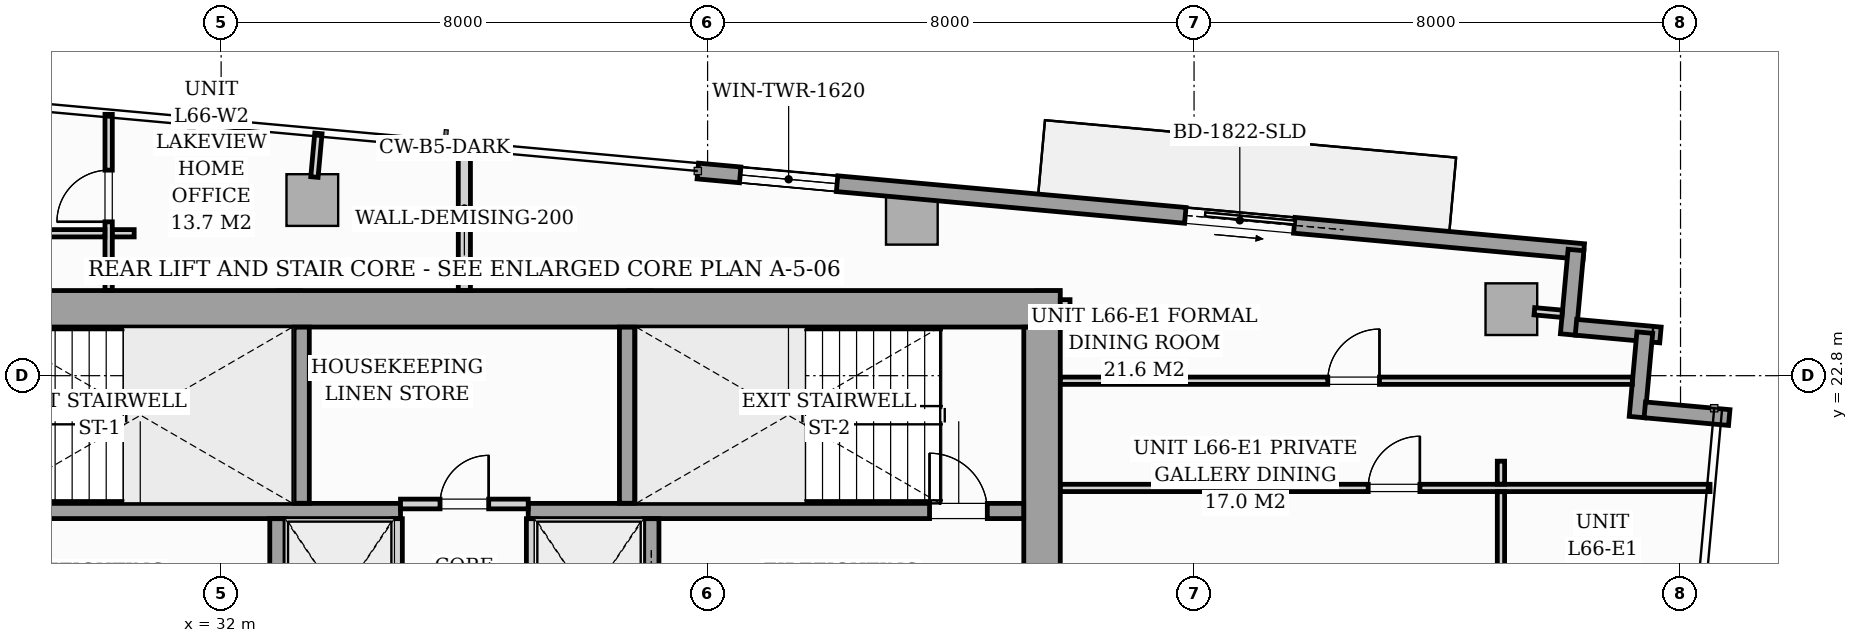
"""IFC4 building model, lengths in metres.
Left out: names, types, materials, properties, quantities, classifications, styles, units other than length and angle.
Written with IfcOpenShell. Run it as: python <this file> out.ifc"""

import sys

from ifc_helpers import new_model, si_unit, direction, frame, frame_2d, origin, origin_2d, place, context, subcontext, project, spatial, rectangle, i_section, extrude, source, transform, mapped, element, fill, save


model = new_model("IFC4")
c1 = context("Model", 3, precision=1e-05, world=origin(), true_north=direction((0.0, 1.0)))
c2 = subcontext(c1, "Body", "Model", "MODEL_VIEW")
j1 = project(units=[si_unit("LENGTHUNIT", "METRE"), si_unit("PLANEANGLEUNIT", "RADIAN")], contexts=[c1])
p1 = place(None, origin())
s1 = spatial("IfcSite", under=j1, at=p1, CompositionType="ELEMENT")
p2 = place(p1, origin())
s2 = spatial("IfcBuilding", under=s1, at=p2, CompositionType="ELEMENT")
p3 = place(p2, frame((0.0, 0.0, 229.8)))
s3 = spatial("IfcBuildingStorey", under=s2, at=p3, CompositionType="ELEMENT", Elevation=229.8)
m1 = source(origin(), c2, "Body", "SweptSolid", [
    extrude(i_section(OverallWidth=0.409, OverallDepth=0.425, WebThickness=0.033, FlangeThickness=0.052, FilletRadius=0.018, at=origin_2d()), origin(), (0.0, 0.0, 1.0), 3.296),
])
for number, where, z_axis, x_axis in (
    (1, (33.12, 24.0, 0.002), (0.0, 0.0, 1.0), (1.0, 0.0, 0.0)),
    (2, (38.88, 24.0, 0.002), (0.0, 0.0, 1.0), (1.0, 0.0, 0.0)),
    (3, (45.6, 24.0, 0.002), (0.0, 0.0, 1.0), (1.0, 0.0, 0.0)),
):
    element("IfcColumn", number, at=place(p3, frame(where, z_axis=z_axis, x_axis=x_axis)), inside=s3, PredefinedType="PILASTER", context=c2, shape_type="MappedRepresentation", body=[
        mapped(m1, transform((0.0, 0.0, 0.0), scale=1.0)),
    ])
m2 = source(origin(), c2, "Body", "SweptSolid", [
    extrude(rectangle(XDim=0.85, YDim=0.85, at=origin_2d()), origin(), (0.0, 0.0, 1.0), 3.296),
])
for number, where, z_axis, x_axis in (
    (4, (33.5, 25.688, 0.002), (0.0, 0.0, 1.0), (0.996, -0.091, 0.0)),
    (5, (43.359, 25.38, 0.002), (0.0, 0.0, 1.0), (0.996, -0.091, 0.0)),
    (6, (53.218, 23.894, 0.002), (0.0, 0.0, 1.0), (0.996, -0.091, 0.0)),
):
    element("IfcColumn", number, at=place(p3, frame(where, z_axis=z_axis, x_axis=x_axis)), inside=s3, PredefinedType="COLUMN", context=c2, shape_type="MappedRepresentation", body=[
        mapped(m2, transform((0.0, 0.0, 0.0), scale=1.0)),
    ])
p4 = place(p3, frame((39.839, 26.166, 0.0), z_axis=(0.0, 0.0, 1.0), x_axis=(0.995884447498, -0.090632043071, 0.0)))
e7 = element("IfcWall", 7, at=p4, inside=s3, PredefinedType="STANDARD", context=c2, shape_type="SweptSolid", body=[
    extrude(rectangle(XDim=14.63, YDim=0.26, at=frame_2d((7.315, 0.0))), origin(), (0.0, 0.0, 1.0), 3.04),
])
p5 = place(p4, frame((8.05, 0.0, 0.0)))
e8 = element("IfcOpeningElement", 8, at=p5, cuts=e7, PredefinedType="OPENING", context=c2, shape_type="SweptSolid", body=[
    extrude(rectangle(XDim=1.8, YDim=2.06, at=frame_2d((0.9, 1.03))), frame((0.0, 0.14, 0.0), z_axis=(0.0, -1.0, 0.0), x_axis=(1.0, 0.0, 0.0)), (0.0, 0.0, 1.0), 0.28),
])
p6 = place(p4, frame((0.7, 0.0, 0.65)))
e9 = element("IfcOpeningElement", 9, at=p6, cuts=e7, PredefinedType="OPENING", context=c2, shape_type="SweptSolid", body=[
    extrude(rectangle(XDim=1.6, YDim=1.5, at=frame_2d((0.8, 0.75))), frame((0.0, 0.14, 0.0), z_axis=(0.0, -1.0, 0.0), x_axis=(1.0, 0.0, 0.0)), (0.0, 0.0, 1.0), 0.28),
])
p7 = place(p3, frame((54.281, 24.866, 0.0), z_axis=(0.0, 0.0, 1.0), x_axis=(-0.090661991521, -0.995881721538, 0.0)))
e10 = element("IfcWall", 10, at=p7, inside=s3, PredefinedType="STANDARD", context=c2, shape_type="SweptSolid", body=[
    extrude(rectangle(XDim=1.395, YDim=0.26, at=frame_2d((0.698, 0.0))), origin(), (0.0, 0.0, 1.0), 3.04),
])
for number, where, z_axis, x_axis in (
    (11, (54.281, 23.596, 0.0), (0.0, 0.0, 1.0), (0.996, -0.091, 0.0)),
    (12, (55.412, 23.508, 0.0), (0.0, 0.0, 1.0), (-0.091, -0.996, 0.0)),
    (13, (55.412, 22.238, 0.0), (0.0, 0.0, 1.0), (0.996, -0.091, 0.0)),
):
    element("IfcWall", number, at=place(p3, frame(where, z_axis=z_axis, x_axis=x_axis)), inside=s3, PredefinedType="STANDARD", context=c2, shape_type="SweptSolid", body=[
        extrude(rectangle(XDim=1.395, YDim=0.26, at=frame_2d((0.698, 0.0))), origin(), (0.0, 0.0, 1.0), 3.04),
    ])
p8 = place(p3, frame((26.2, 23.9, 0.0), z_axis=(0.0, 0.0, 1.0), x_axis=(1.0, 0.0, 0.0)))
e14 = element("IfcWall", 14, at=p8, inside=s3, PredefinedType="SHEAR", context=c2, shape_type="SweptSolid", body=[
    extrude(rectangle(XDim=19.6, YDim=0.6, at=frame_2d((9.8, 0.0))), origin(), (0.0, 0.0, 1.0), 3.3),
])
p9 = place(p3, frame((45.5, 17.802, 0.0), z_axis=(0.0, 0.0, 1.0), x_axis=(0.0, 1.0, 0.0)))
e15 = element("IfcWall", 15, at=p9, inside=s3, PredefinedType="SHEAR", context=c2, shape_type="SweptSolid", body=[
    extrude(rectangle(XDim=5.796, YDim=0.6, at=frame_2d((2.898, 0.0))), origin(), (0.0, 0.0, 1.0), 3.3),
])
p10 = place(p3, frame((26.802, 20.575, 0.0), z_axis=(0.0, 0.0, 1.0), x_axis=(1.0, 0.0, 0.0)))
e16 = element("IfcWall", 16, at=p10, inside=s3, PredefinedType="SOLIDWALL", context=c2, shape_type="SweptSolid", body=[
    extrude(rectangle(XDim=8.148, YDim=0.25, at=frame_2d((4.074, 0.0))), origin(), (0.0, 0.0, 1.0), 3.3),
])
p11 = place(p10, frame((0.298, 0.0, 0.0)))
e17 = element("IfcOpeningElement", 17, at=p11, cuts=e16, PredefinedType="OPENING", context=c2, shape_type="SweptSolid", body=[
    extrude(rectangle(XDim=0.95, YDim=2.06, at=frame_2d((0.475, 1.03))), frame((0.0, 0.135, 0.0), z_axis=(0.0, -1.0, 0.0), x_axis=(1.0, 0.0, 0.0)), (0.0, 0.0, 1.0), 0.27),
])
p12 = place(p3, frame((37.05, 20.575, 0.0), z_axis=(0.0, 0.0, 1.0), x_axis=(1.0, 0.0, 0.0)))
e18 = element("IfcWall", 18, at=p12, inside=s3, PredefinedType="SOLIDWALL", context=c2, shape_type="SweptSolid", body=[
    extrude(rectangle(XDim=8.148, YDim=0.25, at=frame_2d((4.074, 0.0))), origin(), (0.0, 0.0, 1.0), 3.3),
])
p13 = place(p12, frame((6.6, 0.0, 0.0)))
e19 = element("IfcOpeningElement", 19, at=p13, cuts=e18, PredefinedType="OPENING", context=c2, shape_type="SweptSolid", body=[
    extrude(rectangle(XDim=0.95, YDim=2.06, at=frame_2d((0.475, 1.03))), frame((0.0, 0.135, 0.0), z_axis=(0.0, -1.0, 0.0), x_axis=(1.0, 0.0, 0.0)), (0.0, 0.0, 1.0), 0.27),
])
for number, where, z_axis, x_axis in (
    (20, (33.325, 20.702, 0.0), (0.0, 0.0, 1.0), (0.0, 1.0, 0.0)),
    (21, (38.675, 20.702, 0.0), (0.0, 0.0, 1.0), (0.0, 1.0, 0.0)),
):
    element("IfcWall", number, at=place(p3, frame(where, z_axis=z_axis, x_axis=x_axis)), inside=s3, PredefinedType="SOLIDWALL", context=c2, shape_type="SweptSolid", body=[
        extrude(rectangle(XDim=2.896, YDim=0.25, at=frame_2d((1.448, 0.0))), origin(), (0.0, 0.0, 1.0), 3.3),
    ])
p14 = place(p3, frame((32.925, 17.802, 0.0), z_axis=(0.0, 0.0, 1.0), x_axis=(0.0, 1.0, 0.0)))
e22 = element("IfcWall", 22, at=p14, inside=s3, PredefinedType="SOLIDWALL", context=c2, shape_type="SweptSolid", body=[
    extrude(rectangle(XDim=2.646, YDim=0.25, at=frame_2d((1.323, 0.0))), origin(), (0.0, 0.0, 1.0), 3.3),
])
p15 = place(p14, frame((0.548, 0.0, 0.0)))
e23 = element("IfcOpeningElement", 23, at=p15, cuts=e22, PredefinedType="OPENING", context=c2, shape_type="SweptSolid", body=[
    extrude(rectangle(XDim=1.1, YDim=2.08, at=frame_2d((0.55, 1.04))), frame((0.0, 0.135, 0.0), z_axis=(0.0, -1.0, 0.0), x_axis=(1.0, 0.0, 0.0)), (0.0, 0.0, 1.0), 0.27),
])
for number, where, z_axis, x_axis in (
    (24, (34.9, 17.802, 0.0), (0.0, 0.0, 1.0), (0.0, 1.0, 0.0)),
    (25, (37.1, 17.802, 0.0), (0.0, 0.0, 1.0), (0.0, 1.0, 0.0)),
):
    element("IfcWall", number, at=place(p3, frame(where, z_axis=z_axis, x_axis=x_axis)), inside=s3, PredefinedType="PARTITIONING", context=c2, shape_type="SweptSolid", body=[
        extrude(rectangle(XDim=2.646, YDim=0.16, at=frame_2d((1.323, 0.0))), origin(), (0.0, 0.0, 1.0), 3.04),
    ])
p16 = place(p3, frame((39.075, 17.802, 0.0), z_axis=(0.0, 0.0, 1.0), x_axis=(0.0, 1.0, 0.0)))
e26 = element("IfcWall", 26, at=p16, inside=s3, PredefinedType="SOLIDWALL", context=c2, shape_type="SweptSolid", body=[
    extrude(rectangle(XDim=2.646, YDim=0.25, at=frame_2d((1.323, 0.0))), origin(), (0.0, 0.0, 1.0), 3.3),
])
p17 = place(p16, frame((0.548, 0.0, 0.0)))
e27 = element("IfcOpeningElement", 27, at=p17, cuts=e26, PredefinedType="OPENING", context=c2, shape_type="SweptSolid", body=[
    extrude(rectangle(XDim=1.1, YDim=2.08, at=frame_2d((0.55, 1.04))), frame((0.0, 0.135, 0.0), z_axis=(0.0, -1.0, 0.0), x_axis=(1.0, 0.0, 0.0)), (0.0, 0.0, 1.0), 0.27),
])
p18 = place(p3, frame((34.95, 20.69, 0.0), z_axis=(0.0, 0.0, 1.0), x_axis=(1.0, 0.0, 0.0)))
e28 = element("IfcWall", 28, at=p18, inside=s3, PredefinedType="PARTITIONING", context=c2, shape_type="SweptSolid", body=[
    extrude(rectangle(XDim=2.1, YDim=0.16, at=frame_2d((1.05, 0.0))), origin(), (0.0, 0.0, 1.0), 3.04),
])
p19 = place(p18, frame((0.65, 0.0, 0.0)))
e29 = element("IfcOpeningElement", 29, at=p19, cuts=e28, PredefinedType="OPENING", context=c2, shape_type="SweptSolid", body=[
    extrude(rectangle(XDim=0.8, YDim=2.05, at=frame_2d((0.4, 1.025))), frame((0.0, 0.09, 0.0), z_axis=(0.0, -1.0, 0.0), x_axis=(1.0, 0.0, 0.0)), (0.0, 0.0, 1.0), 0.18),
])
p20 = place(p3, frame((45.88, 23.598, 0.0), z_axis=(0.0, 0.0, 1.0), x_axis=(0.0, 1.0, 0.0)))
e30 = element("IfcWall", 30, at=p20, inside=s3, PredefinedType="PARTITIONING", context=c2, shape_type="SweptSolid", body=[
    extrude(rectangle(XDim=0.452, YDim=0.16, at=frame_2d((0.226, 0.0))), origin(), (0.0, 0.0, 1.0), 3.04),
])
p21 = place(p3, frame((36.0, 24.202, 0.0), z_axis=(0.0, 0.0, 1.0), x_axis=(0.0, 1.0, 0.0)))
e31 = element("IfcWall", 31, at=p21, inside=s3, PredefinedType="PARTITIONING", context=c2, shape_type="SweptSolid", body=[
    extrude(rectangle(XDim=2.363, YDim=0.2, at=frame_2d((1.182, 0.0))), origin(), (0.0, 0.0, 1.0), 3.04),
])
p22 = place(p3, frame((30.15, 24.202, 0.0), z_axis=(0.0, 0.0, 1.0), x_axis=(0.0, 1.0, 0.0)))
e32 = element("IfcWall", 32, at=p22, inside=s3, PredefinedType="PARTITIONING", context=c2, shape_type="SweptSolid", body=[
    extrude(rectangle(XDim=2.896, YDim=0.12, at=frame_2d((1.448, 0.0))), origin(), (0.0, 0.0, 1.0), 3.04),
])
p23 = place(p22, frame((1.128, 0.0, 0.0)))
e33 = element("IfcOpeningElement", 33, at=p23, cuts=e32, PredefinedType="OPENING", context=c2, shape_type="SweptSolid", body=[
    extrude(rectangle(XDim=0.85, YDim=2.05, at=frame_2d((0.425, 1.025))), frame((0.0, 0.07, 0.0), z_axis=(0.0, -1.0, 0.0), x_axis=(1.0, 0.0, 0.0)), (0.0, 0.0, 1.0), 0.14),
])
p24 = place(p3, frame((20.107, 25.142, 0.0), z_axis=(0.0, 0.0, 1.0), x_axis=(1.0, 0.0, 0.0)))
e34 = element("IfcWall", 34, at=p24, inside=s3, PredefinedType="PARTITIONING", context=c2, shape_type="SweptSolid", body=[
    extrude(rectangle(XDim=9.981, YDim=0.12, at=frame_2d((4.99, 0.0))), origin(), (0.0, 0.0, 1.0), 3.04),
])
p25 = place(p24, frame((4.526, 0.0, 0.0)))
e35 = element("IfcOpeningElement", 35, at=p25, cuts=e34, PredefinedType="OPENING", context=c2, shape_type="SweptSolid", body=[
    extrude(rectangle(XDim=0.85, YDim=2.05, at=frame_2d((0.425, 1.025))), frame((0.0, 0.07, 0.0), z_axis=(0.0, -1.0, 0.0), x_axis=(1.0, 0.0, 0.0)), (0.0, 0.0, 1.0), 0.14),
])
p26 = place(p3, frame((30.212, 25.142, 0.0), z_axis=(0.0, 0.0, 1.0), x_axis=(1.0, 0.0, 0.0)))
e36 = element("IfcWall", 36, at=p26, inside=s3, PredefinedType="PARTITIONING", context=c2, shape_type="SweptSolid", body=[
    extrude(rectangle(XDim=0.358, YDim=0.12, at=frame_2d((0.179, 0.0))), origin(), (0.0, 0.0, 1.0), 3.04),
])
p27 = place(p3, frame((45.802, 22.717, 0.0), z_axis=(0.0, 0.0, 1.0), x_axis=(1.0, 0.0, 0.0)))
e37 = element("IfcWall", 37, at=p27, inside=s3, PredefinedType="PARTITIONING", context=c2, shape_type="SweptSolid", body=[
    extrude(rectangle(XDim=9.406, YDim=0.12, at=frame_2d((4.703, 0.0))), origin(), (0.0, 0.0, 1.0), 3.04),
])
p28 = place(p27, frame((4.397, 0.0, 0.0)))
e38 = element("IfcOpeningElement", 38, at=p28, cuts=e37, PredefinedType="OPENING", context=c2, shape_type="SweptSolid", body=[
    extrude(rectangle(XDim=0.85, YDim=2.05, at=frame_2d((0.425, 1.025))), frame((0.0, 0.07, 0.0), z_axis=(0.0, -1.0, 0.0), x_axis=(1.0, 0.0, 0.0)), (0.0, 0.0, 1.0), 0.14),
])
p29 = place(p3, frame((45.802, 20.954, 0.0), z_axis=(0.0, 0.0, 1.0), x_axis=(1.0, 0.0, 0.0)))
e39 = element("IfcWall", 39, at=p29, inside=s3, PredefinedType="PARTITIONING", context=c2, shape_type="SweptSolid", body=[
    extrude(rectangle(XDim=10.683, YDim=0.12, at=frame_2d((5.342, 0.0))), origin(), (0.0, 0.0, 1.0), 3.04),
])
p30 = place(p29, frame((5.062, 0.0, 0.0)))
e40 = element("IfcOpeningElement", 40, at=p30, cuts=e39, PredefinedType="OPENING", context=c2, shape_type="SweptSolid", body=[
    extrude(rectangle(XDim=0.85, YDim=2.05, at=frame_2d((0.425, 1.025))), frame((0.0, 0.07, 0.0), z_axis=(0.0, -1.0, 0.0), x_axis=(1.0, 0.0, 0.0)), (0.0, 0.0, 1.0), 0.14),
])
p31 = place(p3, frame((53.047, 10.808, 0.0), z_axis=(0.0, 0.0, 1.0), x_axis=(0.0, 1.0, 0.0)))
e41 = element("IfcWall", 41, at=p31, inside=s3, PredefinedType="PARTITIONING", context=c2, shape_type="SweptSolid", body=[
    extrude(rectangle(XDim=10.084, YDim=0.12, at=frame_2d((5.042, 0.0))), origin(), (0.0, 0.0, 1.0), 3.04),
])
p32 = place(p31, frame((3.54, 0.0, 0.0)))
e42 = element("IfcOpeningElement", 42, at=p32, cuts=e41, PredefinedType="OPENING", context=c2, shape_type="SweptSolid", body=[
    extrude(rectangle(XDim=0.85, YDim=2.05, at=frame_2d((0.425, 1.025))), frame((0.0, 0.07, 0.0), z_axis=(0.0, -1.0, 0.0), x_axis=(1.0, 0.0, 0.0)), (0.0, 0.0, 1.0), 0.14),
])
p33 = place(p3, frame((53.047, 21.016, 0.0), z_axis=(0.0, 0.0, 1.0), x_axis=(0.0, 1.0, 0.0)))
e43 = element("IfcWall", 43, at=p33, inside=s3, PredefinedType="PARTITIONING", context=c2, shape_type="SweptSolid", body=[
    extrude(rectangle(XDim=0.378, YDim=0.12, at=frame_2d((0.189, 0.0))), origin(), (0.0, 0.0, 1.0), 3.04),
])
p34 = place(p3, frame((33.534, 26.067, 0.0), z_axis=(0.0, 0.0, 1.0), x_axis=(0.090535746043, 0.995893206468, 0.0)))
e44 = element("IfcWall", 44, at=p34, inside=s3, PredefinedType="PARTITIONING", context=c2, shape_type="SweptSolid", body=[
    extrude(rectangle(XDim=0.72, YDim=0.12, at=frame_2d((0.36, 0.0))), origin(), (0.0, 0.0, 1.0), 3.04),
])
p35 = place(p3, frame((53.597, 23.859, 0.0), z_axis=(0.0, 0.0, 1.0), x_axis=(0.995884462012, -0.090631883588, 0.0)))
e45 = element("IfcWall", 45, at=p35, inside=s3, PredefinedType="PARTITIONING", context=c2, shape_type="SweptSolid", body=[
    extrude(rectangle(XDim=0.458, YDim=0.12, at=frame_2d((0.229, 0.0))), origin(), (0.0, 0.0, 1.0), 3.04),
])
m3 = source(origin(), c2, "Body", "SweptSolid", [
    extrude(rectangle(XDim=1.8, YDim=2.06, at=frame_2d((0.9, 1.03))), frame((0.0, 0.025, 0.0), z_axis=(0.0, -1.0, 0.0), x_axis=(1.0, 0.0, 0.0)), (0.0, 0.0, 1.0), 0.05),
])
p36 = place(p5, origin())
e46 = element("IfcDoor", 46, at=p36, inside=s3, OperationType="SLIDING_TO_RIGHT", PredefinedType="DOOR", context=c2, shape_type="MappedRepresentation", body=[
    mapped(m3, transform((0.0, 0.0, 0.0), scale=1.0)),
])
fill(e8, e46)
m4 = source(origin(), c2, "Body", "SweptSolid", [
    extrude(rectangle(XDim=1.6, YDim=1.5, at=frame_2d((0.8, 0.75))), frame((0.0, 0.03, 0.0), z_axis=(0.0, -1.0, 0.0), x_axis=(1.0, 0.0, 0.0)), (0.0, 0.0, 1.0), 0.06),
])
p37 = place(p6, origin())
e47 = element("IfcWindow", 47, at=p37, inside=s3, PartitioningType="SINGLE_PANEL", PredefinedType="WINDOW", context=c2, shape_type="MappedRepresentation", body=[
    mapped(m4, transform((0.0, 0.0, 0.0), scale=1.0)),
])
fill(e9, e47)
m5 = source(origin(), c2, "Body", "SweptSolid", [
    extrude(rectangle(XDim=0.95, YDim=2.06, at=frame_2d((0.475, 1.03))), frame((0.0, 0.025, 0.0), z_axis=(0.0, -1.0, 0.0), x_axis=(1.0, 0.0, 0.0)), (0.0, 0.0, 1.0), 0.05),
])
p38 = place(p13, origin())
e48 = element("IfcDoor", 48, at=p38, inside=s3, OperationType="SINGLE_SWING_LEFT", PredefinedType="DOOR", context=c2, shape_type="MappedRepresentation", body=[
    mapped(m5, transform((0.0, 0.0, 0.0), scale=1.0)),
])
fill(e19, e48)
m6 = source(origin(), c2, "Body", "SweptSolid", [
    extrude(rectangle(XDim=0.8, YDim=2.05, at=frame_2d((0.4, 1.025))), frame((0.0, 0.025, 0.0), z_axis=(0.0, -1.0, 0.0), x_axis=(1.0, 0.0, 0.0)), (0.0, 0.0, 1.0), 0.05),
])
p39 = place(p19, origin())
e49 = element("IfcDoor", 49, at=p39, inside=s3, OperationType="SINGLE_SWING_RIGHT", PredefinedType="DOOR", context=c2, shape_type="MappedRepresentation", body=[
    mapped(m6, transform((0.0, 0.0, 0.0), scale=1.0)),
])
fill(e29, e49)
m7 = source(origin(), c2, "Body", "SweptSolid", [
    extrude(rectangle(XDim=0.85, YDim=2.05, at=frame_2d((0.425, 1.025))), frame((0.0, 0.025, 0.0), z_axis=(0.0, -1.0, 0.0), x_axis=(1.0, 0.0, 0.0)), (0.0, 0.0, 1.0), 0.05),
])
p40 = place(p23, origin())
e50 = element("IfcDoor", 50, at=p40, inside=s3, OperationType="SINGLE_SWING_LEFT", PredefinedType="DOOR", context=c2, shape_type="MappedRepresentation", body=[
    mapped(m7, transform((0.0, 0.0, 0.0), scale=1.0)),
])
fill(e33, e50)
p41 = place(p28, origin())
e51 = element("IfcDoor", 51, at=p41, inside=s3, OperationType="SINGLE_SWING_RIGHT", PredefinedType="DOOR", context=c2, shape_type="MappedRepresentation", body=[
    mapped(m7, transform((0.0, 0.0, 0.0), scale=1.0)),
])
fill(e38, e51)
p42 = place(p30, origin())
e52 = element("IfcDoor", 52, at=p42, inside=s3, OperationType="SINGLE_SWING_RIGHT", PredefinedType="DOOR", context=c2, shape_type="MappedRepresentation", body=[
    mapped(m7, transform((0.0, 0.0, 0.0), scale=1.0)),
])
fill(e40, e52)
save(model, sys.argv[1])
